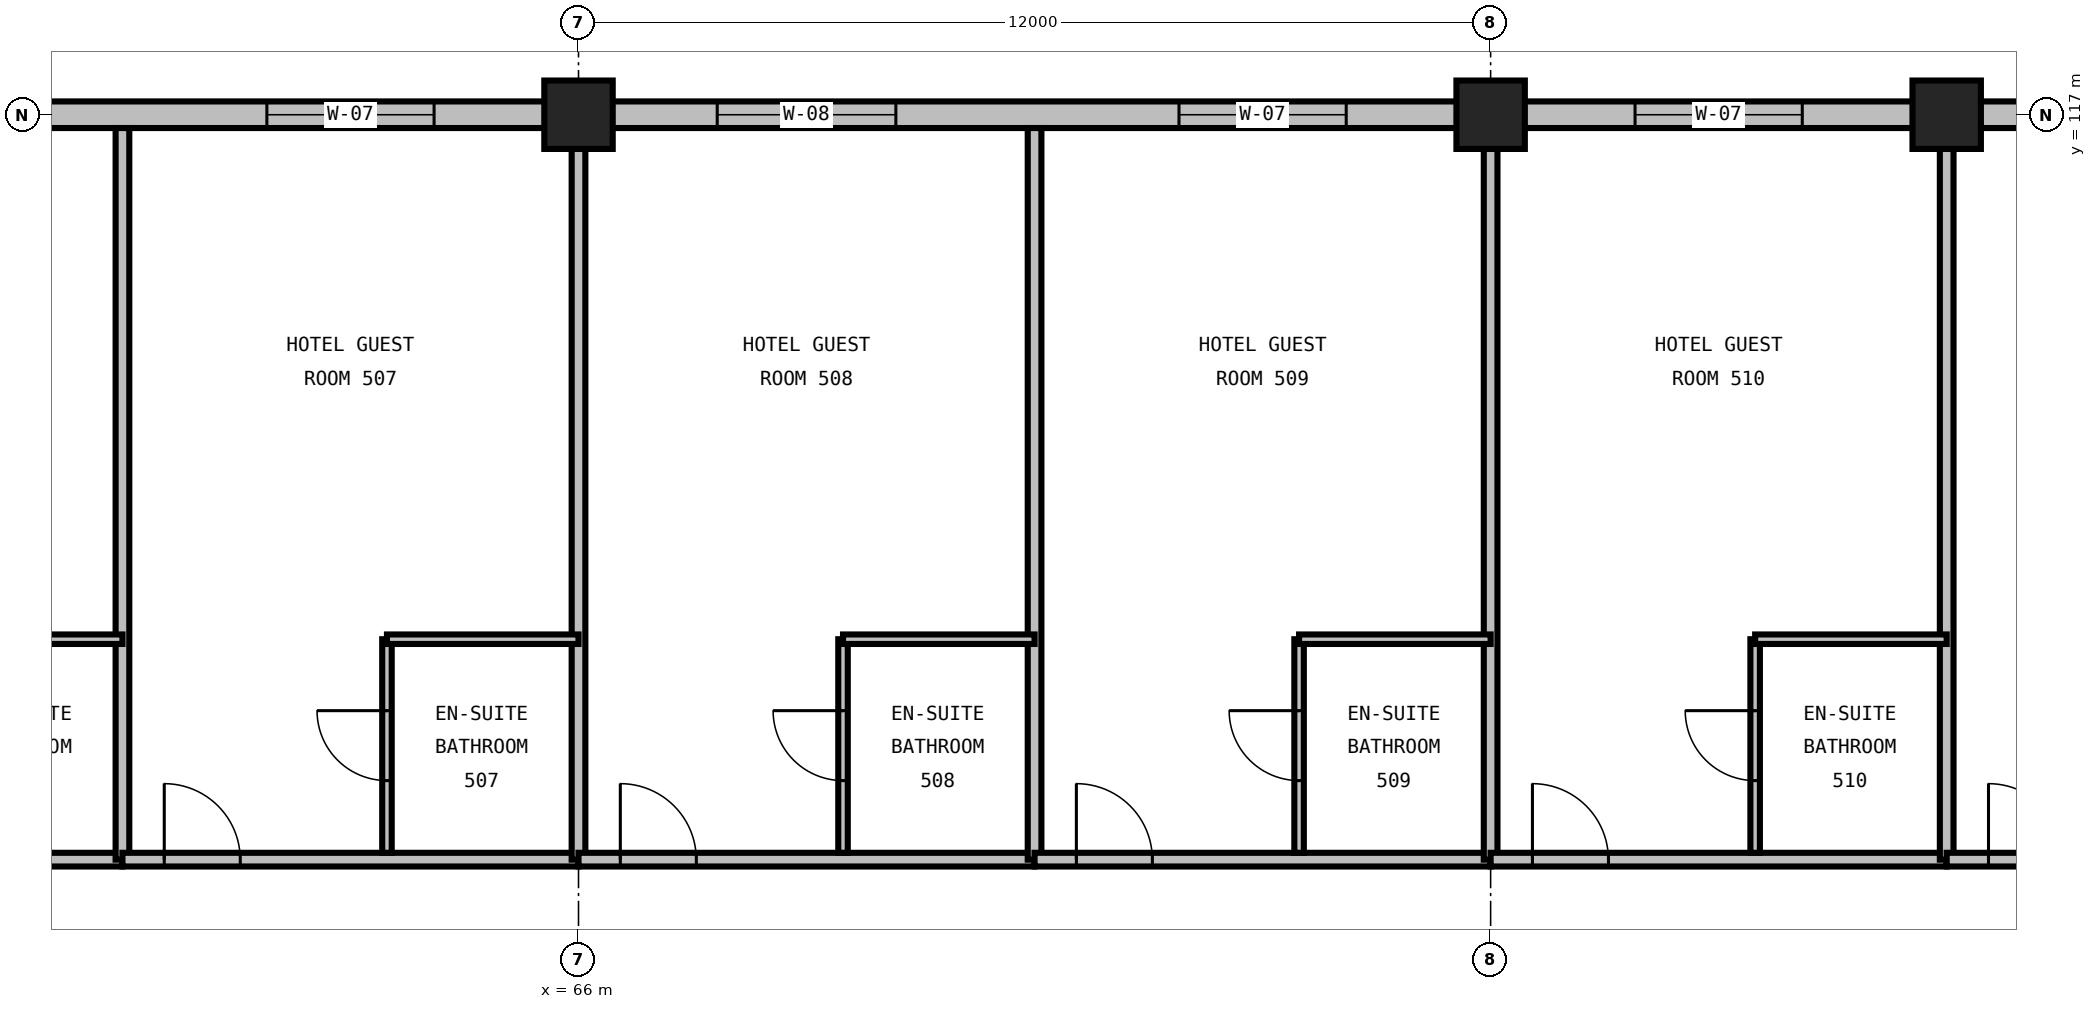
"""IFC4 building model, lengths in metres.
Left out: names, types, materials, properties, quantities, classifications, styles, units other than length and angle.
Written with IfcOpenShell. Run it as: python <this file> out.ifc"""

import sys

from ifc_helpers import new_model, si_unit, direction, frame, frame_2d, origin, origin_2d, place, context, subcontext, project, spatial, rectangle, extrude, element, fill, save


model = new_model("IFC4")
c1 = context("Model", 3, precision=1e-05, world=origin(), true_north=direction((0.0, 1.0)))
c2 = subcontext(c1, "Body", "Model", "MODEL_VIEW")
j1 = project(units=[si_unit("LENGTHUNIT", "METRE"), si_unit("PLANEANGLEUNIT", "RADIAN")], contexts=[c1])
p1 = place(None, origin())
s1 = spatial("IfcSite", under=j1, at=p1, CompositionType="ELEMENT")
p2 = place(p1, origin())
s2 = spatial("IfcBuilding", under=s1, at=p2, CompositionType="ELEMENT")
p3 = place(p2, frame((0.0, 0.0, 27.6)))
s3 = spatial("IfcBuildingStorey", under=s2, at=p3, CompositionType="ELEMENT", Elevation=27.6)
for number, where, z_axis, x_axis in (
    (1, (66.0, 117.0, 0.0), (0.0, 0.0, 1.0), (1.0, 0.0, 0.0)),
    (2, (78.0, 117.0, 0.0), (0.0, 0.0, 1.0), (1.0, 0.0, 0.0)),
    (3, (84.0, 117.0, 0.0), (0.0, 0.0, 1.0), (1.0, 0.0, 0.0)),
):
    element("IfcColumn", number, at=place(p3, frame(where, z_axis=z_axis, x_axis=x_axis)), inside=s3, PredefinedType="COLUMN", context=c2, shape_type="SweptSolid", body=[
        extrude(rectangle(XDim=0.9, YDim=0.9, at=origin_2d()), origin(), (0.0, 0.0, 1.0), 3.6),
    ])
p4 = place(p3, frame((66.0, 117.0, 0.0), z_axis=(0.0, 0.0, 1.0), x_axis=(-1.0, 0.0, 0.0)))
e4 = element("IfcWall", 4, at=p4, inside=s3, PredefinedType="STANDARD", context=c2, shape_type="SweptSolid", body=[
    extrude(rectangle(XDim=12.0, YDim=0.35, at=frame_2d((6.0, 0.0))), origin(), (0.0, 0.0, 1.0), 2.486),
])
p5 = place(p4, frame((1.9, 0.0, 0.75)))
e5 = element("IfcOpeningElement", 5, at=p5, cuts=e4, PredefinedType="OPENING", context=c2, shape_type="SweptSolid", body=[
    extrude(rectangle(XDim=2.2, YDim=1.6, at=frame_2d((1.1, 0.8))), frame((0.0, 0.19, 0.0), z_axis=(0.0, -1.0, 0.0), x_axis=(1.0, 0.0, 0.0)), (0.0, 0.0, 1.0), 0.38),
])
p6 = place(p4, frame((7.825, 0.0, 0.75)))
e6 = element("IfcOpeningElement", 6, at=p6, cuts=e4, PredefinedType="OPENING", context=c2, shape_type="SweptSolid", body=[
    extrude(rectangle(XDim=2.35, YDim=1.6, at=frame_2d((1.175, 0.8))), frame((0.0, 0.19, 0.0), z_axis=(0.0, -1.0, 0.0), x_axis=(1.0, 0.0, 0.0)), (0.0, 0.0, 1.0), 0.38),
])
p7 = place(p3, frame((78.0, 117.0, 0.0), z_axis=(0.0, 0.0, 1.0), x_axis=(-1.0, 0.0, 0.0)))
e7 = element("IfcWall", 7, at=p7, inside=s3, PredefinedType="STANDARD", context=c2, shape_type="SweptSolid", body=[
    extrude(rectangle(XDim=12.0, YDim=0.35, at=frame_2d((6.0, 0.0))), origin(), (0.0, 0.0, 1.0), 2.486),
])
p8 = place(p7, frame((1.9, 0.0, 0.75)))
e8 = element("IfcOpeningElement", 8, at=p8, cuts=e7, PredefinedType="OPENING", context=c2, shape_type="SweptSolid", body=[
    extrude(rectangle(XDim=2.2, YDim=1.6, at=frame_2d((1.1, 0.8))), frame((0.0, 0.19, 0.0), z_axis=(0.0, -1.0, 0.0), x_axis=(1.0, 0.0, 0.0)), (0.0, 0.0, 1.0), 0.38),
])
p9 = place(p7, frame((7.825, 0.0, 0.75)))
e9 = element("IfcOpeningElement", 9, at=p9, cuts=e7, PredefinedType="OPENING", context=c2, shape_type="SweptSolid", body=[
    extrude(rectangle(XDim=2.35, YDim=1.6, at=frame_2d((1.175, 0.8))), frame((0.0, 0.19, 0.0), z_axis=(0.0, -1.0, 0.0), x_axis=(1.0, 0.0, 0.0)), (0.0, 0.0, 1.0), 0.38),
])
p10 = place(p3, frame((84.0, 117.0, 0.0), z_axis=(0.0, 0.0, 1.0), x_axis=(-1.0, 0.0, 0.0)))
e10 = element("IfcWall", 10, at=p10, inside=s3, PredefinedType="STANDARD", context=c2, shape_type="SweptSolid", body=[
    extrude(rectangle(XDim=6.0, YDim=0.35, at=frame_2d((3.0, 0.0))), origin(), (0.0, 0.0, 1.0), 2.486),
])
p11 = place(p10, frame((1.9, 0.0, 0.75)))
e11 = element("IfcOpeningElement", 11, at=p11, cuts=e10, PredefinedType="OPENING", context=c2, shape_type="SweptSolid", body=[
    extrude(rectangle(XDim=2.2, YDim=1.6, at=frame_2d((1.1, 0.8))), frame((0.0, 0.19, 0.0), z_axis=(0.0, -1.0, 0.0), x_axis=(1.0, 0.0, 0.0)), (0.0, 0.0, 1.0), 0.38),
])
p12 = place(p3, frame((90.0, 117.0, 0.0), z_axis=(0.0, 0.0, 1.0), x_axis=(-1.0, 0.0, 0.0)))
e12 = element("IfcWall", 12, at=p12, inside=s3, PredefinedType="STANDARD", context=c2, shape_type="SweptSolid", body=[
    extrude(rectangle(XDim=6.0, YDim=0.35, at=frame_2d((3.0, 0.0))), origin(), (0.0, 0.0, 1.0), 2.486),
])
p13 = place(p12, frame((1.9, 0.0, 0.75)))
e13 = element("IfcOpeningElement", 13, at=p13, cuts=e12, PredefinedType="OPENING", context=c2, shape_type="SweptSolid", body=[
    extrude(rectangle(XDim=2.2, YDim=1.6, at=frame_2d((1.1, 0.8))), frame((0.0, 0.19, 0.0), z_axis=(0.0, -1.0, 0.0), x_axis=(1.0, 0.0, 0.0)), (0.0, 0.0, 1.0), 0.38),
])
p14 = place(p3, frame((54.0, 107.2, 0.0), z_axis=(0.0, 0.0, 1.0), x_axis=(1.0, 0.0, 0.0)))
e14 = element("IfcWall", 14, at=p14, inside=s3, PredefinedType="PARTITIONING", context=c2, shape_type="SweptSolid", body=[
    extrude(rectangle(XDim=6.0, YDim=0.18, at=frame_2d((3.0, 0.0))), origin(), (0.0, 0.0, 1.0), 3.29),
])
p15 = place(p14, frame((0.55, 0.0, 0.0)))
e15 = element("IfcOpeningElement", 15, at=p15, cuts=e14, PredefinedType="OPENING", context=c2, shape_type="SweptSolid", body=[
    extrude(rectangle(XDim=1.0, YDim=2.15, at=frame_2d((0.5, 1.075))), frame((0.0, 0.105, 0.0), z_axis=(0.0, -1.0, 0.0), x_axis=(1.0, 0.0, 0.0)), (0.0, 0.0, 1.0), 0.21),
])
p16 = place(p3, frame((60.0, 107.2, 0.0), z_axis=(0.0, 0.0, 1.0), x_axis=(0.0, 1.0, 0.0)))
e16 = element("IfcWall", 16, at=p16, inside=s3, PredefinedType="PARTITIONING", context=c2, shape_type="SweptSolid", body=[
    extrude(rectangle(XDim=9.625, YDim=0.18, at=frame_2d((4.812, 0.0))), origin(), (0.0, 0.0, 1.0), 3.29),
])
p17 = place(p3, frame((57.48, 110.1, 0.0), z_axis=(0.0, 0.0, 1.0), x_axis=(1.0, 0.0, 0.0)))
e17 = element("IfcWall", 17, at=p17, inside=s3, PredefinedType="PARTITIONING", context=c2, shape_type="SweptSolid", body=[
    extrude(rectangle(XDim=2.52, YDim=0.125, at=frame_2d((1.26, 0.0))), origin(), (0.0, 0.0, 1.0), 3.29),
])
p18 = place(p3, frame((60.0, 107.2, 0.0), z_axis=(0.0, 0.0, 1.0), x_axis=(1.0, 0.0, 0.0)))
e18 = element("IfcWall", 18, at=p18, inside=s3, PredefinedType="PARTITIONING", context=c2, shape_type="SweptSolid", body=[
    extrude(rectangle(XDim=6.0, YDim=0.18, at=frame_2d((3.0, 0.0))), origin(), (0.0, 0.0, 1.0), 3.29),
])
p19 = place(p18, frame((0.55, 0.0, 0.0)))
e19 = element("IfcOpeningElement", 19, at=p19, cuts=e18, PredefinedType="OPENING", context=c2, shape_type="SweptSolid", body=[
    extrude(rectangle(XDim=1.0, YDim=2.15, at=frame_2d((0.5, 1.075))), frame((0.0, 0.105, 0.0), z_axis=(0.0, -1.0, 0.0), x_axis=(1.0, 0.0, 0.0)), (0.0, 0.0, 1.0), 0.21),
])
p20 = place(p3, frame((66.0, 107.2, 0.0), z_axis=(0.0, 0.0, 1.0), x_axis=(0.0, 1.0, 0.0)))
e20 = element("IfcWall", 20, at=p20, inside=s3, PredefinedType="PARTITIONING", context=c2, shape_type="SweptSolid", body=[
    extrude(rectangle(XDim=9.625, YDim=0.18, at=frame_2d((4.812, 0.0))), origin(), (0.0, 0.0, 1.0), 2.59),
])
p21 = place(p3, frame((63.48, 107.29, 0.0), z_axis=(0.0, 0.0, 1.0), x_axis=(0.0, 1.0, 0.0)))
e21 = element("IfcWall", 21, at=p21, inside=s3, PredefinedType="PARTITIONING", context=c2, shape_type="SweptSolid", body=[
    extrude(rectangle(XDim=2.81, YDim=0.125, at=frame_2d((1.405, 0.0))), origin(), (0.0, 0.0, 1.0), 3.29),
])
p22 = place(p21, frame((0.95, 0.0, 0.0)))
e22 = element("IfcOpeningElement", 22, at=p22, cuts=e21, PredefinedType="OPENING", context=c2, shape_type="SweptSolid", body=[
    extrude(rectangle(XDim=0.92, YDim=2.1, at=frame_2d((0.46, 1.05))), frame((0.0, 0.077, 0.0), z_axis=(0.0, -1.0, 0.0), x_axis=(1.0, 0.0, 0.0)), (0.0, 0.0, 1.0), 0.155),
])
p23 = place(p3, frame((63.48, 110.1, 0.0), z_axis=(0.0, 0.0, 1.0), x_axis=(1.0, 0.0, 0.0)))
e23 = element("IfcWall", 23, at=p23, inside=s3, PredefinedType="PARTITIONING", context=c2, shape_type="SweptSolid", body=[
    extrude(rectangle(XDim=2.52, YDim=0.125, at=frame_2d((1.26, 0.0))), origin(), (0.0, 0.0, 1.0), 3.29),
])
p24 = place(p3, frame((66.0, 107.2, 0.0), z_axis=(0.0, 0.0, 1.0), x_axis=(1.0, 0.0, 0.0)))
e24 = element("IfcWall", 24, at=p24, inside=s3, PredefinedType="PARTITIONING", context=c2, shape_type="SweptSolid", body=[
    extrude(rectangle(XDim=6.0, YDim=0.18, at=frame_2d((3.0, 0.0))), origin(), (0.0, 0.0, 1.0), 3.29),
])
p25 = place(p24, frame((0.55, 0.0, 0.0)))
e25 = element("IfcOpeningElement", 25, at=p25, cuts=e24, PredefinedType="OPENING", context=c2, shape_type="SweptSolid", body=[
    extrude(rectangle(XDim=1.0, YDim=2.15, at=frame_2d((0.5, 1.075))), frame((0.0, 0.105, 0.0), z_axis=(0.0, -1.0, 0.0), x_axis=(1.0, 0.0, 0.0)), (0.0, 0.0, 1.0), 0.21),
])
p26 = place(p3, frame((72.0, 107.2, 0.0), z_axis=(0.0, 0.0, 1.0), x_axis=(0.0, 1.0, 0.0)))
e26 = element("IfcWall", 26, at=p26, inside=s3, PredefinedType="PARTITIONING", context=c2, shape_type="SweptSolid", body=[
    extrude(rectangle(XDim=9.625, YDim=0.18, at=frame_2d((4.812, 0.0))), origin(), (0.0, 0.0, 1.0), 3.29),
])
p27 = place(p3, frame((69.48, 107.29, 0.0), z_axis=(0.0, 0.0, 1.0), x_axis=(0.0, 1.0, 0.0)))
e27 = element("IfcWall", 27, at=p27, inside=s3, PredefinedType="PARTITIONING", context=c2, shape_type="SweptSolid", body=[
    extrude(rectangle(XDim=2.81, YDim=0.125, at=frame_2d((1.405, 0.0))), origin(), (0.0, 0.0, 1.0), 3.29),
])
p28 = place(p27, frame((0.95, 0.0, 0.0)))
e28 = element("IfcOpeningElement", 28, at=p28, cuts=e27, PredefinedType="OPENING", context=c2, shape_type="SweptSolid", body=[
    extrude(rectangle(XDim=0.92, YDim=2.1, at=frame_2d((0.46, 1.05))), frame((0.0, 0.077, 0.0), z_axis=(0.0, -1.0, 0.0), x_axis=(1.0, 0.0, 0.0)), (0.0, 0.0, 1.0), 0.155),
])
p29 = place(p3, frame((69.48, 110.1, 0.0), z_axis=(0.0, 0.0, 1.0), x_axis=(1.0, 0.0, 0.0)))
e29 = element("IfcWall", 29, at=p29, inside=s3, PredefinedType="PARTITIONING", context=c2, shape_type="SweptSolid", body=[
    extrude(rectangle(XDim=2.52, YDim=0.125, at=frame_2d((1.26, 0.0))), origin(), (0.0, 0.0, 1.0), 3.29),
])
p30 = place(p3, frame((72.0, 107.2, 0.0), z_axis=(0.0, 0.0, 1.0), x_axis=(1.0, 0.0, 0.0)))
e30 = element("IfcWall", 30, at=p30, inside=s3, PredefinedType="PARTITIONING", context=c2, shape_type="SweptSolid", body=[
    extrude(rectangle(XDim=6.0, YDim=0.18, at=frame_2d((3.0, 0.0))), origin(), (0.0, 0.0, 1.0), 3.29),
])
p31 = place(p30, frame((0.55, 0.0, 0.0)))
e31 = element("IfcOpeningElement", 31, at=p31, cuts=e30, PredefinedType="OPENING", context=c2, shape_type="SweptSolid", body=[
    extrude(rectangle(XDim=1.0, YDim=2.15, at=frame_2d((0.5, 1.075))), frame((0.0, 0.105, 0.0), z_axis=(0.0, -1.0, 0.0), x_axis=(1.0, 0.0, 0.0)), (0.0, 0.0, 1.0), 0.21),
])
p32 = place(p3, frame((78.0, 107.2, 0.0), z_axis=(0.0, 0.0, 1.0), x_axis=(0.0, 1.0, 0.0)))
e32 = element("IfcWall", 32, at=p32, inside=s3, PredefinedType="PARTITIONING", context=c2, shape_type="SweptSolid", body=[
    extrude(rectangle(XDim=9.625, YDim=0.18, at=frame_2d((4.812, 0.0))), origin(), (0.0, 0.0, 1.0), 2.59),
])
p33 = place(p3, frame((75.48, 107.29, 0.0), z_axis=(0.0, 0.0, 1.0), x_axis=(0.0, 1.0, 0.0)))
e33 = element("IfcWall", 33, at=p33, inside=s3, PredefinedType="PARTITIONING", context=c2, shape_type="SweptSolid", body=[
    extrude(rectangle(XDim=2.81, YDim=0.125, at=frame_2d((1.405, 0.0))), origin(), (0.0, 0.0, 1.0), 3.29),
])
p34 = place(p33, frame((0.95, 0.0, 0.0)))
e34 = element("IfcOpeningElement", 34, at=p34, cuts=e33, PredefinedType="OPENING", context=c2, shape_type="SweptSolid", body=[
    extrude(rectangle(XDim=0.92, YDim=2.1, at=frame_2d((0.46, 1.05))), frame((0.0, 0.077, 0.0), z_axis=(0.0, -1.0, 0.0), x_axis=(1.0, 0.0, 0.0)), (0.0, 0.0, 1.0), 0.155),
])
p35 = place(p3, frame((75.48, 110.1, 0.0), z_axis=(0.0, 0.0, 1.0), x_axis=(1.0, 0.0, 0.0)))
e35 = element("IfcWall", 35, at=p35, inside=s3, PredefinedType="PARTITIONING", context=c2, shape_type="SweptSolid", body=[
    extrude(rectangle(XDim=2.52, YDim=0.125, at=frame_2d((1.26, 0.0))), origin(), (0.0, 0.0, 1.0), 3.29),
])
p36 = place(p3, frame((78.0, 107.2, 0.0), z_axis=(0.0, 0.0, 1.0), x_axis=(1.0, 0.0, 0.0)))
e36 = element("IfcWall", 36, at=p36, inside=s3, PredefinedType="PARTITIONING", context=c2, shape_type="SweptSolid", body=[
    extrude(rectangle(XDim=6.0, YDim=0.18, at=frame_2d((3.0, 0.0))), origin(), (0.0, 0.0, 1.0), 3.29),
])
p37 = place(p36, frame((0.55, 0.0, 0.0)))
e37 = element("IfcOpeningElement", 37, at=p37, cuts=e36, PredefinedType="OPENING", context=c2, shape_type="SweptSolid", body=[
    extrude(rectangle(XDim=1.0, YDim=2.15, at=frame_2d((0.5, 1.075))), frame((0.0, 0.105, 0.0), z_axis=(0.0, -1.0, 0.0), x_axis=(1.0, 0.0, 0.0)), (0.0, 0.0, 1.0), 0.21),
])
p38 = place(p3, frame((84.0, 107.2, 0.0), z_axis=(0.0, 0.0, 1.0), x_axis=(0.0, 1.0, 0.0)))
e38 = element("IfcWall", 38, at=p38, inside=s3, PredefinedType="PARTITIONING", context=c2, shape_type="SweptSolid", body=[
    extrude(rectangle(XDim=9.625, YDim=0.18, at=frame_2d((4.812, 0.0))), origin(), (0.0, 0.0, 1.0), 2.59),
])
p39 = place(p3, frame((81.48, 107.29, 0.0), z_axis=(0.0, 0.0, 1.0), x_axis=(0.0, 1.0, 0.0)))
e39 = element("IfcWall", 39, at=p39, inside=s3, PredefinedType="PARTITIONING", context=c2, shape_type="SweptSolid", body=[
    extrude(rectangle(XDim=2.81, YDim=0.125, at=frame_2d((1.405, 0.0))), origin(), (0.0, 0.0, 1.0), 3.29),
])
p40 = place(p39, frame((0.95, 0.0, 0.0)))
e40 = element("IfcOpeningElement", 40, at=p40, cuts=e39, PredefinedType="OPENING", context=c2, shape_type="SweptSolid", body=[
    extrude(rectangle(XDim=0.92, YDim=2.1, at=frame_2d((0.46, 1.05))), frame((0.0, 0.077, 0.0), z_axis=(0.0, -1.0, 0.0), x_axis=(1.0, 0.0, 0.0)), (0.0, 0.0, 1.0), 0.155),
])
p41 = place(p3, frame((81.48, 110.1, 0.0), z_axis=(0.0, 0.0, 1.0), x_axis=(1.0, 0.0, 0.0)))
e41 = element("IfcWall", 41, at=p41, inside=s3, PredefinedType="PARTITIONING", context=c2, shape_type="SweptSolid", body=[
    extrude(rectangle(XDim=2.52, YDim=0.125, at=frame_2d((1.26, 0.0))), origin(), (0.0, 0.0, 1.0), 3.29),
])
p42 = place(p3, frame((84.0, 107.2, 0.0), z_axis=(0.0, 0.0, 1.0), x_axis=(1.0, 0.0, 0.0)))
e42 = element("IfcWall", 42, at=p42, inside=s3, PredefinedType="PARTITIONING", context=c2, shape_type="SweptSolid", body=[
    extrude(rectangle(XDim=6.0, YDim=0.18, at=frame_2d((3.0, 0.0))), origin(), (0.0, 0.0, 1.0), 3.29),
])
p43 = place(p42, frame((0.55, 0.0, 0.0)))
e43 = element("IfcOpeningElement", 43, at=p43, cuts=e42, PredefinedType="OPENING", context=c2, shape_type="SweptSolid", body=[
    extrude(rectangle(XDim=1.0, YDim=2.15, at=frame_2d((0.5, 1.075))), frame((0.0, 0.105, 0.0), z_axis=(0.0, -1.0, 0.0), x_axis=(1.0, 0.0, 0.0)), (0.0, 0.0, 1.0), 0.21),
])
p44 = place(p5, origin())
e44 = element("IfcWindow", 44, at=p44, inside=s3, PartitioningType="DOUBLE_PANEL_VERTICAL", PredefinedType="WINDOW", context=c2, shape_type="SweptSolid", body=[
    extrude(rectangle(XDim=2.2, YDim=1.6, at=frame_2d((1.1, 0.8))), frame((0.0, 0.03, 0.0), z_axis=(0.0, -1.0, 0.0), x_axis=(1.0, 0.0, 0.0)), (0.0, 0.0, 1.0), 0.06),
])
fill(e5, e44)
p45 = place(p8, origin())
e45 = element("IfcWindow", 45, at=p45, inside=s3, PartitioningType="DOUBLE_PANEL_VERTICAL", PredefinedType="WINDOW", context=c2, shape_type="SweptSolid", body=[
    extrude(rectangle(XDim=2.2, YDim=1.6, at=frame_2d((1.1, 0.8))), frame((0.0, 0.03, 0.0), z_axis=(0.0, -1.0, 0.0), x_axis=(1.0, 0.0, 0.0)), (0.0, 0.0, 1.0), 0.06),
])
fill(e8, e45)
p46 = place(p9, origin())
e46 = element("IfcWindow", 46, at=p46, inside=s3, PartitioningType="DOUBLE_PANEL_VERTICAL", PredefinedType="WINDOW", context=c2, shape_type="SweptSolid", body=[
    extrude(rectangle(XDim=2.35, YDim=1.6, at=frame_2d((1.175, 0.8))), frame((0.0, 0.03, 0.0), z_axis=(0.0, -1.0, 0.0), x_axis=(1.0, 0.0, 0.0)), (0.0, 0.0, 1.0), 0.06),
])
fill(e9, e46)
p47 = place(p11, origin())
e47 = element("IfcWindow", 47, at=p47, inside=s3, PartitioningType="DOUBLE_PANEL_VERTICAL", PredefinedType="WINDOW", context=c2, shape_type="SweptSolid", body=[
    extrude(rectangle(XDim=2.2, YDim=1.6, at=frame_2d((1.1, 0.8))), frame((0.0, 0.03, 0.0), z_axis=(0.0, -1.0, 0.0), x_axis=(1.0, 0.0, 0.0)), (0.0, 0.0, 1.0), 0.06),
])
fill(e11, e47)
p48 = place(p19, origin())
e48 = element("IfcDoor", 48, at=p48, inside=s3, OperationType="SINGLE_SWING_LEFT", PredefinedType="DOOR", context=c2, shape_type="SweptSolid", body=[
    extrude(rectangle(XDim=1.0, YDim=2.15, at=frame_2d((0.5, 1.075))), frame((0.0, 0.025, 0.0), z_axis=(0.0, -1.0, 0.0), x_axis=(1.0, 0.0, 0.0)), (0.0, 0.0, 1.0), 0.05),
])
fill(e19, e48)
p49 = place(p22, origin())
e49 = element("IfcDoor", 49, at=p49, inside=s3, OperationType="SINGLE_SWING_RIGHT", PredefinedType="DOOR", context=c2, shape_type="SweptSolid", body=[
    extrude(rectangle(XDim=0.92, YDim=2.1, at=frame_2d((0.46, 1.05))), frame((0.0, 0.025, 0.0), z_axis=(0.0, -1.0, 0.0), x_axis=(1.0, 0.0, 0.0)), (0.0, 0.0, 1.0), 0.05),
])
fill(e22, e49)
p50 = place(p25, origin())
e50 = element("IfcDoor", 50, at=p50, inside=s3, OperationType="SINGLE_SWING_LEFT", PredefinedType="DOOR", context=c2, shape_type="SweptSolid", body=[
    extrude(rectangle(XDim=1.0, YDim=2.15, at=frame_2d((0.5, 1.075))), frame((0.0, 0.025, 0.0), z_axis=(0.0, -1.0, 0.0), x_axis=(1.0, 0.0, 0.0)), (0.0, 0.0, 1.0), 0.05),
])
fill(e25, e50)
p51 = place(p28, origin())
e51 = element("IfcDoor", 51, at=p51, inside=s3, OperationType="SINGLE_SWING_RIGHT", PredefinedType="DOOR", context=c2, shape_type="SweptSolid", body=[
    extrude(rectangle(XDim=0.92, YDim=2.1, at=frame_2d((0.46, 1.05))), frame((0.0, 0.025, 0.0), z_axis=(0.0, -1.0, 0.0), x_axis=(1.0, 0.0, 0.0)), (0.0, 0.0, 1.0), 0.05),
])
fill(e28, e51)
p52 = place(p31, origin())
e52 = element("IfcDoor", 52, at=p52, inside=s3, OperationType="SINGLE_SWING_LEFT", PredefinedType="DOOR", context=c2, shape_type="SweptSolid", body=[
    extrude(rectangle(XDim=1.0, YDim=2.15, at=frame_2d((0.5, 1.075))), frame((0.0, 0.025, 0.0), z_axis=(0.0, -1.0, 0.0), x_axis=(1.0, 0.0, 0.0)), (0.0, 0.0, 1.0), 0.05),
])
fill(e31, e52)
p53 = place(p34, origin())
e53 = element("IfcDoor", 53, at=p53, inside=s3, OperationType="SINGLE_SWING_RIGHT", PredefinedType="DOOR", context=c2, shape_type="SweptSolid", body=[
    extrude(rectangle(XDim=0.92, YDim=2.1, at=frame_2d((0.46, 1.05))), frame((0.0, 0.025, 0.0), z_axis=(0.0, -1.0, 0.0), x_axis=(1.0, 0.0, 0.0)), (0.0, 0.0, 1.0), 0.05),
])
fill(e34, e53)
p54 = place(p37, origin())
e54 = element("IfcDoor", 54, at=p54, inside=s3, OperationType="SINGLE_SWING_LEFT", PredefinedType="DOOR", context=c2, shape_type="SweptSolid", body=[
    extrude(rectangle(XDim=1.0, YDim=2.15, at=frame_2d((0.5, 1.075))), frame((0.0, 0.025, 0.0), z_axis=(0.0, -1.0, 0.0), x_axis=(1.0, 0.0, 0.0)), (0.0, 0.0, 1.0), 0.05),
])
fill(e37, e54)
p55 = place(p40, origin())
e55 = element("IfcDoor", 55, at=p55, inside=s3, OperationType="SINGLE_SWING_RIGHT", PredefinedType="DOOR", context=c2, shape_type="SweptSolid", body=[
    extrude(rectangle(XDim=0.92, YDim=2.1, at=frame_2d((0.46, 1.05))), frame((0.0, 0.025, 0.0), z_axis=(0.0, -1.0, 0.0), x_axis=(1.0, 0.0, 0.0)), (0.0, 0.0, 1.0), 0.05),
])
fill(e40, e55)
p56 = place(p43, origin())
e56 = element("IfcDoor", 56, at=p56, inside=s3, OperationType="SINGLE_SWING_LEFT", PredefinedType="DOOR", context=c2, shape_type="SweptSolid", body=[
    extrude(rectangle(XDim=1.0, YDim=2.15, at=frame_2d((0.5, 1.075))), frame((0.0, 0.025, 0.0), z_axis=(0.0, -1.0, 0.0), x_axis=(1.0, 0.0, 0.0)), (0.0, 0.0, 1.0), 0.05),
])
fill(e43, e56)
save(model, sys.argv[1])
